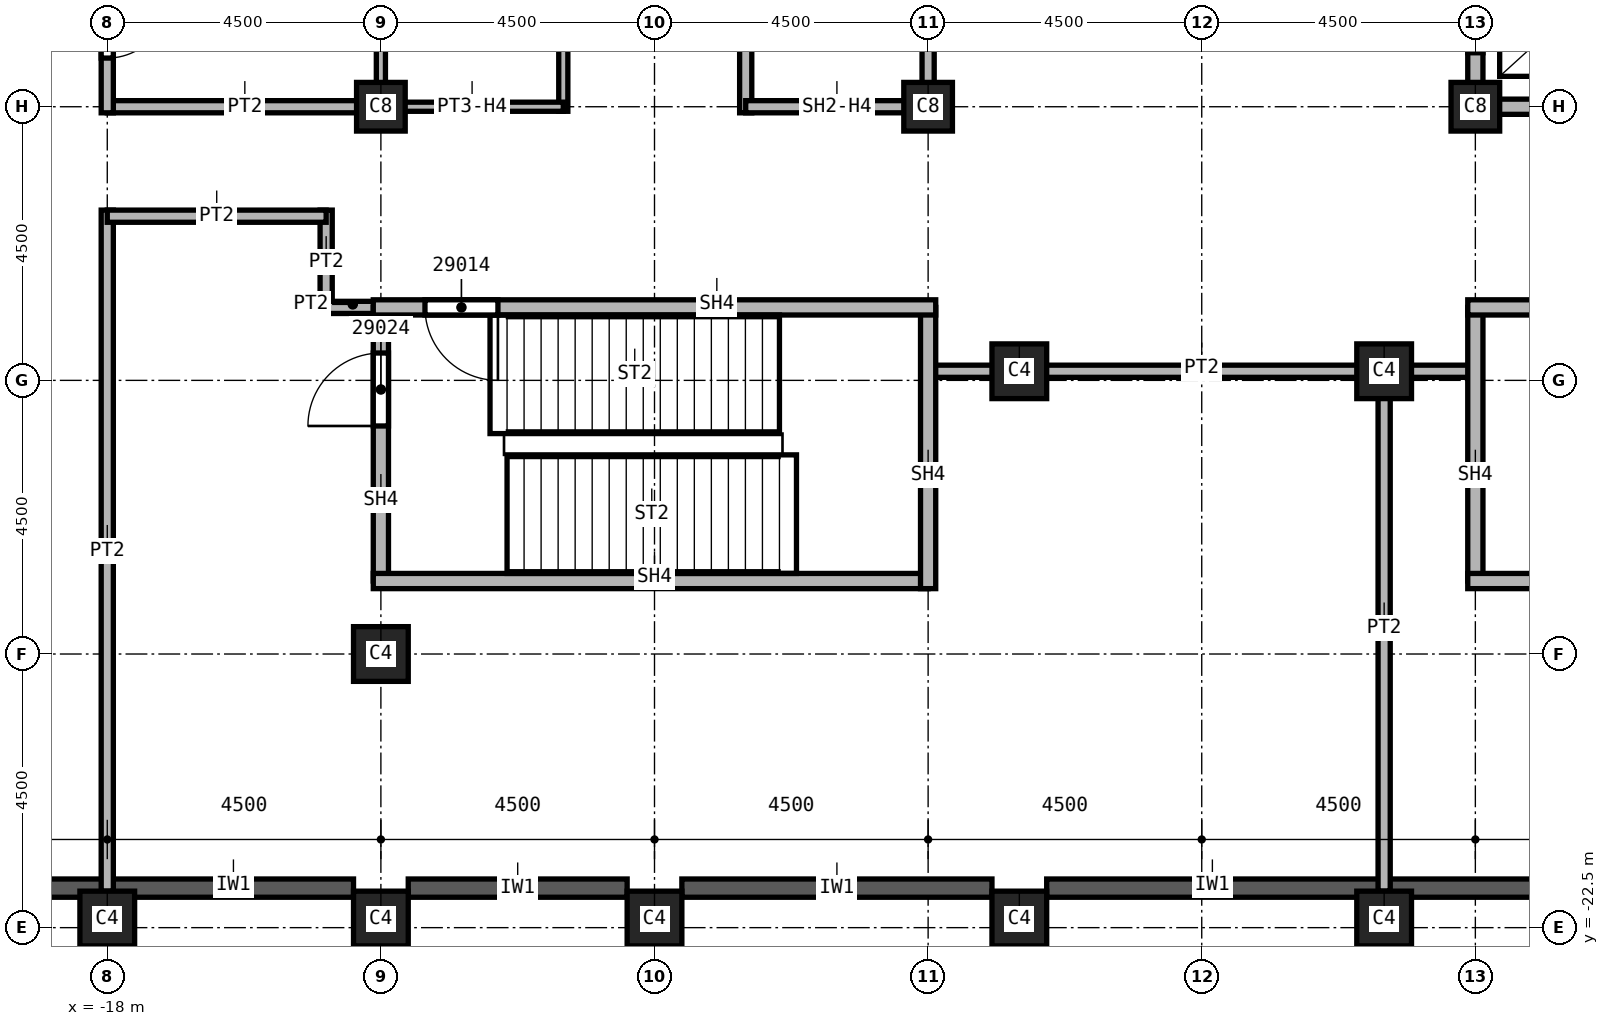
"""IFC4 building model, lengths in metres.
Left out: names, types, materials, properties, quantities, classifications, styles, units other than length and angle.
Written with IfcOpenShell. Run it as: python <this file> out.ifc"""

import sys

from ifc_helpers import new_model, si_unit, direction, frame, frame_2d, origin, origin_2d, place, context, subcontext, project, spatial, rectangle, extrude, element, fill, save


model = new_model("IFC4")
c1 = context("Model", 3, precision=1e-05, world=origin(), true_north=direction((0.0, 1.0)))
c2 = subcontext(c1, "Body", "Model", "MODEL_VIEW")
j1 = project(units=[si_unit("LENGTHUNIT", "METRE"), si_unit("PLANEANGLEUNIT", "RADIAN")], contexts=[c1])
p1 = place(None, origin())
s1 = spatial("IfcSite", under=j1, at=p1, CompositionType="ELEMENT")
p2 = place(p1, origin())
s2 = spatial("IfcBuilding", under=s1, at=p2, CompositionType="ELEMENT")
p3 = place(p2, frame((0.0, 0.0, 294.0)))
s3 = spatial("IfcBuildingStorey", under=s2, at=p3, CompositionType="ELEMENT", Elevation=294.0)
p4 = place(p3, frame((-13.5, -18.0, 0.0), z_axis=(0.0, 0.0, 1.0), x_axis=(1.0, 0.0, 0.0)))
e1 = element("IfcColumn", 1, at=p4, inside=s3, PredefinedType="COLUMN", context=c2, shape_type="SweptSolid", body=[
    extrude(rectangle(XDim=0.9, YDim=0.9, at=origin_2d()), origin(), (0.0, 0.0, 1.0), 5.74),
])
for number, where, z_axis, x_axis in (
    (2, (4.5, -9.0, 0.0), (0.0, 0.0, 1.0), (1.0, 0.0, 0.0)),
    (3, (-4.5, -9.0, 0.0), (0.0, 0.0, 1.0), (1.0, 0.0, 0.0)),
    (4, (-13.5, -9.0, 0.0), (0.0, 0.0, 1.0), (1.0, 0.0, 0.0)),
):
    element("IfcColumn", number, at=place(p3, frame(where, z_axis=z_axis, x_axis=x_axis)), inside=s3, PredefinedType="COLUMN", context=c2, shape_type="SweptSolid", body=[
        extrude(rectangle(XDim=0.8, YDim=0.8, at=origin_2d()), origin(), (0.0, 0.0, 1.0), 5.74),
    ])
for number, where, z_axis, x_axis in (
    (5, (3.0, -22.35, 0.0), (0.0, -0.18, 0.984), (1.0, 0.0, 0.0)),
    (6, (-3.0, -22.35, 0.0), (0.0, -0.18, 0.984), (1.0, 0.0, 0.0)),
    (7, (-9.0, -22.35, 0.0), (0.0, -0.18, 0.984), (1.0, 0.0, 0.0)),
    (8, (-13.5, -22.35, 0.0), (0.0, -0.18, 0.984), (1.0, 0.0, 0.0)),
    (9, (-18.0, -22.35, 0.0), (0.0, -0.18, 0.984), (1.0, 0.0, 0.0)),
    (10, (3.0, -13.35, 0.0), (0.0, -0.18, 0.984), (1.0, 0.0, 0.0)),
    (11, (-3.0, -13.35, 0.0), (0.0, -0.18, 0.984), (1.0, 0.0, 0.0)),
):
    element("IfcColumn", number, at=place(p3, frame(where, z_axis=z_axis, x_axis=x_axis)), inside=s3, PredefinedType="COLUMN", context=c2, shape_type="SweptSolid", body=[
        extrude(rectangle(XDim=0.9, YDim=0.9, at=origin_2d()), origin(), (0.0, 0.0, 1.0), 5.835),
    ])
for number, where, z_axis, x_axis in (
    (12, (-22.05, -21.85, 0.0), (0.0, 0.0, 1.0), (1.0, 0.0, 0.0)),
    (13, (-17.95, -21.85, 0.0), (0.0, 0.0, 1.0), (1.0, 0.0, 0.0)),
):
    element("IfcWall", number, at=place(p3, frame(where, z_axis=z_axis, x_axis=x_axis)), inside=s3, PredefinedType="SOLIDWALL", context=c2, shape_type="SweptSolid", body=[
        extrude(rectangle(XDim=4.0, YDim=0.3, at=frame_2d((2.0, 0.0))), origin(), (0.0, 0.0, 1.0), 5.14),
    ])
p5 = place(p3, frame((-13.05, -21.85, 0.0), z_axis=(0.0, 0.0, 1.0), x_axis=(1.0, 0.0, 0.0)))
e14 = element("IfcWall", 14, at=p5, inside=s3, PredefinedType="SOLIDWALL", context=c2, shape_type="SweptSolid", body=[
    extrude(rectangle(XDim=3.6, YDim=0.3, at=frame_2d((1.8, 0.0))), origin(), (0.0, 0.0, 1.0), 5.14),
])
p6 = place(p3, frame((-8.55, -21.85, 0.0), z_axis=(0.0, 0.0, 1.0), x_axis=(1.0, 0.0, 0.0)))
e15 = element("IfcWall", 15, at=p6, inside=s3, PredefinedType="SOLIDWALL", context=c2, shape_type="SweptSolid", body=[
    extrude(rectangle(XDim=5.1, YDim=0.3, at=frame_2d((2.55, 0.0))), origin(), (0.0, 0.0, 1.0), 5.14),
])
for number, where, z_axis, x_axis in (
    (16, (-2.55, -21.85, 0.0), (0.0, 0.0, 1.0), (1.0, 0.0, 0.0)),
    (17, (3.05, -21.85, 0.0), (0.0, 0.0, 1.0), (1.0, 0.0, 0.0)),
):
    element("IfcWall", number, at=place(p3, frame(where, z_axis=z_axis, x_axis=x_axis)), inside=s3, PredefinedType="SOLIDWALL", context=c2, shape_type="SweptSolid", body=[
        extrude(rectangle(XDim=5.5, YDim=0.3, at=frame_2d((2.75, 0.0))), origin(), (0.0, 0.0, 1.0), 5.14),
    ])
p7 = place(p3, frame((-18.0, -10.7, 0.0), z_axis=(0.0, 0.0, 1.0), x_axis=(0.0, -1.0, 0.0)))
e18 = element("IfcWall", 18, at=p7, inside=s3, PredefinedType="PARTITIONING", context=c2, shape_type="SweptSolid", body=[
    extrude(rectangle(XDim=11.2, YDim=0.2, at=frame_2d((5.6, 0.0))), origin(), (0.0, 0.0, 1.0), 5.74),
])
p8 = place(p3, frame((-18.0, -9.0, 0.0), z_axis=(0.0, 0.0, 1.0), x_axis=(1.0, 0.0, 0.0)))
e19 = element("IfcWall", 19, at=p8, inside=s3, PredefinedType="PARTITIONING", context=c2, shape_type="SweptSolid", body=[
    extrude(rectangle(XDim=4.5, YDim=0.2, at=frame_2d((2.25, 0.0))), origin(), (0.0, 0.0, 1.0), 5.74),
])
p9 = place(p3, frame((-18.0, 9.1, 0.0), z_axis=(0.0, 0.0, 1.0), x_axis=(0.0, -1.0, 0.0)))
e20 = element("IfcWall", 20, at=p9, inside=s3, PredefinedType="PARTITIONING", context=c2, shape_type="SweptSolid", body=[
    extrude(rectangle(XDim=18.2, YDim=0.2, at=frame_2d((9.1, 0.0))), origin(), (0.0, 0.0, 1.0), 5.74),
])
p10 = place(p9, frame((16.3, 0.0, 0.0)))
e21 = element("IfcOpeningElement", 21, at=p10, cuts=e20, PredefinedType="OPENING", context=c2, shape_type="SweptSolid", body=[
    extrude(rectangle(XDim=1.0, YDim=2.1, at=frame_2d((0.5, 1.05))), frame((0.0, 0.1, 0.0), z_axis=(0.0, -1.0, 0.0), x_axis=(1.0, 0.0, 0.0)), (0.0, 0.0, 1.0), 0.2),
])
p11 = place(p9, frame((6.4, 0.0, 0.0)))
e22 = element("IfcOpeningElement", 22, at=p11, cuts=e20, PredefinedType="OPENING", context=c2, shape_type="SweptSolid", body=[
    extrude(rectangle(XDim=1.0, YDim=2.1, at=frame_2d((0.5, 1.05))), frame((0.0, 0.1, 0.0), z_axis=(0.0, -1.0, 0.0), x_axis=(1.0, 0.0, 0.0)), (0.0, 0.0, 1.0), 0.2),
])
p12 = place(p3, frame((-14.4, -12.3, 0.0), z_axis=(0.0, 0.0, 1.0), x_axis=(0.0, 1.0, 0.0)))
e23 = element("IfcWall", 23, at=p12, inside=s3, PredefinedType="PARTITIONING", context=c2, shape_type="SweptSolid", body=[
    extrude(rectangle(XDim=1.6, YDim=0.2, at=frame_2d((0.8, 0.0))), origin(), (0.0, 0.0, 1.0), 5.74),
])
p13 = place(p3, frame((-14.4, -10.8, 0.0), z_axis=(0.0, 0.0, 1.0), x_axis=(-1.0, 0.0, 0.0)))
e24 = element("IfcWall", 24, at=p13, inside=s3, PredefinedType="PARTITIONING", context=c2, shape_type="SweptSolid", body=[
    extrude(rectangle(XDim=3.6, YDim=0.2, at=frame_2d((1.8, 0.0))), origin(), (0.0, 0.0, 1.0), 5.74),
])
p14 = place(p3, frame((-13.375, -12.3, 0.0), z_axis=(0.0, 0.0, 1.0), x_axis=(-1.0, 0.0, 0.0)))
e25 = element("IfcWall", 25, at=p14, inside=s3, PredefinedType="PARTITIONING", context=c2, shape_type="SweptSolid", body=[
    extrude(rectangle(XDim=1.125, YDim=0.2, at=frame_2d((0.562, 0.0))), origin(), (0.0, 0.0, 1.0), 5.74),
])
p15 = place(p3, frame((4.5, -13.35, 0.0), z_axis=(0.0, 0.0, 1.0), x_axis=(-1.0, 0.0, 0.0)))
e26 = element("IfcWall", 26, at=p15, inside=s3, PredefinedType="PARTITIONING", context=c2, shape_type="SweptSolid", body=[
    extrude(rectangle(XDim=9.0, YDim=0.2, at=frame_2d((4.5, 0.0))), origin(), (0.0, 0.0, 1.0), 5.74),
])
p16 = place(p3, frame((3.0, -13.35, 0.0), z_axis=(0.0, 0.0, 1.0), x_axis=(0.0, -1.0, 0.0)))
e27 = element("IfcWall", 27, at=p16, inside=s3, PredefinedType="PARTITIONING", context=c2, shape_type="SweptSolid", body=[
    extrude(rectangle(XDim=8.55, YDim=0.2, at=frame_2d((4.275, 0.0))), origin(), (0.0, 0.0, 1.0), 5.74),
])
p17 = place(p3, frame((-7.5, -9.1, 0.0), z_axis=(0.0, 0.0, 1.0), x_axis=(0.0, 1.0, 0.0)))
e28 = element("IfcWall", 28, at=p17, inside=s3, PredefinedType="SOLIDWALL", context=c2, shape_type="SweptSolid", body=[
    extrude(rectangle(XDim=6.225, YDim=0.2, at=frame_2d((3.113, 0.0))), origin(), (0.0, 0.0, 1.0), 5.74),
])
p18 = place(p3, frame((-4.5, -9.0, 0.0), z_axis=(0.0, 0.0, 1.0), x_axis=(-1.0, 0.0, 0.0)))
e29 = element("IfcWall", 29, at=p18, inside=s3, PredefinedType="SOLIDWALL", context=c2, shape_type="SweptSolid", body=[
    extrude(rectangle(XDim=3.0, YDim=0.2, at=frame_2d((1.5, 0.0))), origin(), (0.0, 0.0, 1.0), 5.062),
])
p19 = place(p3, frame((-4.5, 0.0, 0.0), z_axis=(0.0, 0.0, 1.0), x_axis=(0.0, -1.0, 0.0)))
e30 = element("IfcWall", 30, at=p19, inside=s3, PredefinedType="SOLIDWALL", context=c2, shape_type="SweptSolid", body=[
    extrude(rectangle(XDim=9.1, YDim=0.2, at=frame_2d((4.55, 0.0))), origin(), (0.0, 0.0, 1.0), 5.062),
])
p20 = place(p19, frame((1.3, 0.0, 0.0)))
e31 = element("IfcOpeningElement", 31, at=p20, cuts=e30, PredefinedType="OPENING", context=c2, shape_type="SweptSolid", body=[
    extrude(rectangle(XDim=1.1, YDim=2.1, at=frame_2d((0.55, 1.05))), frame((0.0, 0.1, 0.0), z_axis=(0.0, -1.0, 0.0), x_axis=(1.0, 0.0, 0.0)), (0.0, 0.0, 1.0), 0.2),
])
p21 = place(p3, frame((4.5, -9.125, 0.0), z_axis=(0.0, 0.0, 1.0), x_axis=(0.0, 1.0, 0.0)))
e32 = element("IfcWall", 32, at=p21, inside=s3, PredefinedType="SOLIDWALL", context=c2, shape_type="SweptSolid", body=[
    extrude(rectangle(XDim=9.125, YDim=0.25, at=frame_2d((4.562, 0.0))), origin(), (0.0, 0.0, 1.0), 5.062),
])
p22 = place(p21, frame((1.012, 0.0, 0.0)))
e33 = element("IfcOpeningElement", 33, at=p22, cuts=e32, PredefinedType="OPENING", context=c2, shape_type="SweptSolid", body=[
    extrude(rectangle(XDim=1.1, YDim=2.1, at=frame_2d((0.55, 1.05))), frame((0.0, 0.125, 0.0), z_axis=(0.0, -1.0, 0.0), x_axis=(1.0, 0.0, 0.0)), (0.0, 0.0, 1.0), 0.25),
])
p23 = place(p21, frame((4.075, 0.0, 0.0)))
e34 = element("IfcOpeningElement", 34, at=p23, cuts=e32, PredefinedType="OPENING", context=c2, shape_type="SweptSolid", body=[
    extrude(rectangle(XDim=1.1, YDim=2.1, at=frame_2d((0.55, 1.05))), frame((0.0, 0.125, 0.0), z_axis=(0.0, -1.0, 0.0), x_axis=(1.0, 0.0, 0.0)), (0.0, 0.0, 1.0), 0.25),
])
p24 = place(p21, frame((7.075, 0.0, 0.0)))
e35 = element("IfcOpeningElement", 35, at=p24, cuts=e32, PredefinedType="OPENING", context=c2, shape_type="SweptSolid", body=[
    extrude(rectangle(XDim=1.1, YDim=2.1, at=frame_2d((0.55, 1.05))), frame((0.0, 0.125, 0.0), z_axis=(0.0, -1.0, 0.0), x_axis=(1.0, 0.0, 0.0)), (0.0, 0.0, 1.0), 0.25),
])
p25 = place(p3, frame((7.5, -9.0, 0.0), z_axis=(0.0, 0.0, 1.0), x_axis=(-1.0, 0.0, 0.0)))
e36 = element("IfcWall", 36, at=p25, inside=s3, PredefinedType="SOLIDWALL", context=c2, shape_type="SweptSolid", body=[
    extrude(rectangle(XDim=3.0, YDim=0.25, at=frame_2d((1.5, 0.0))), origin(), (0.0, 0.0, 1.0), 5.062),
])
p26 = place(p3, frame((-13.5, -16.8, 0.0), z_axis=(0.0, 0.0, 1.0), x_axis=(0.0, 1.0, 0.0)))
e37 = element("IfcWall", 37, at=p26, inside=s3, PredefinedType="SOLIDWALL", context=c2, shape_type="SweptSolid", body=[
    extrude(rectangle(XDim=4.5, YDim=0.25, at=frame_2d((2.25, 0.0))), origin(), (0.0, 0.0, 1.0), 5.74),
])
p27 = place(p26, frame((2.55, 0.0, 0.0)))
e38 = element("IfcOpeningElement", 38, at=p27, cuts=e37, PredefinedType="OPENING", context=c2, shape_type="SweptSolid", body=[
    extrude(rectangle(XDim=1.2, YDim=2.1, at=frame_2d((0.6, 1.05))), frame((0.0, 0.125, 0.0), z_axis=(0.0, -1.0, 0.0), x_axis=(1.0, 0.0, 0.0)), (0.0, 0.0, 1.0), 0.25),
])
p28 = place(p3, frame((-4.5, -16.8, 0.0), z_axis=(0.0, 0.0, 1.0), x_axis=(-1.0, 0.0, 0.0)))
e39 = element("IfcWall", 39, at=p28, inside=s3, PredefinedType="SOLIDWALL", context=c2, shape_type="SweptSolid", body=[
    extrude(rectangle(XDim=9.125, YDim=0.25, at=frame_2d((4.562, 0.0))), origin(), (0.0, 0.0, 1.0), 5.74),
])
p29 = place(p3, frame((-4.5, -12.3, 0.0), z_axis=(0.0, 0.0, 1.0), x_axis=(0.0, -1.0, 0.0)))
e40 = element("IfcWall", 40, at=p29, inside=s3, PredefinedType="SOLIDWALL", context=c2, shape_type="SweptSolid", body=[
    extrude(rectangle(XDim=4.625, YDim=0.25, at=frame_2d((2.312, 0.0))), origin(), (0.0, 0.0, 1.0), 5.74),
])
p30 = place(p3, frame((-4.375, -12.3, 0.0), z_axis=(0.0, 0.0, 1.0), x_axis=(-1.0, 0.0, 0.0)))
e41 = element("IfcWall", 41, at=p30, inside=s3, PredefinedType="SOLIDWALL", context=c2, shape_type="SweptSolid", body=[
    extrude(rectangle(XDim=9.25, YDim=0.25, at=frame_2d((4.625, 0.0))), origin(), (0.0, 0.0, 1.0), 5.74),
])
p31 = place(p30, frame((7.2, 0.0, 0.0)))
e42 = element("IfcOpeningElement", 42, at=p31, cuts=e41, PredefinedType="OPENING", context=c2, shape_type="SweptSolid", body=[
    extrude(rectangle(XDim=1.2, YDim=2.1, at=frame_2d((0.6, 1.05))), frame((0.0, 0.125, 0.0), z_axis=(0.0, -1.0, 0.0), x_axis=(1.0, 0.0, 0.0)), (0.0, 0.0, 1.0), 0.25),
])
p32 = place(p3, frame((4.5, -16.8, 0.0), z_axis=(0.0, 0.0, 1.0), x_axis=(0.0, 1.0, 0.0)))
e43 = element("IfcWall", 43, at=p32, inside=s3, PredefinedType="SOLIDWALL", context=c2, shape_type="SweptSolid", body=[
    extrude(rectangle(XDim=4.5, YDim=0.25, at=frame_2d((2.25, 0.0))), origin(), (0.0, 0.0, 1.0), 5.74),
])
p33 = place(p3, frame((13.5, -16.8, 0.0), z_axis=(0.0, 0.0, 1.0), x_axis=(-1.0, 0.0, 0.0)))
e44 = element("IfcWall", 44, at=p33, inside=s3, PredefinedType="SOLIDWALL", context=c2, shape_type="SweptSolid", body=[
    extrude(rectangle(XDim=9.125, YDim=0.25, at=frame_2d((4.562, 0.0))), origin(), (0.0, 0.0, 1.0), 5.74),
])
p34 = place(p3, frame((13.625, -12.3, 0.0), z_axis=(0.0, 0.0, 1.0), x_axis=(-1.0, 0.0, 0.0)))
e45 = element("IfcWall", 45, at=p34, inside=s3, PredefinedType="SOLIDWALL", context=c2, shape_type="SweptSolid", body=[
    extrude(rectangle(XDim=9.25, YDim=0.25, at=frame_2d((4.625, 0.0))), origin(), (0.0, 0.0, 1.0), 5.74),
])
p35 = place(p34, frame((0.85, 0.0, 0.0)))
e46 = element("IfcOpeningElement", 46, at=p35, cuts=e45, PredefinedType="OPENING", context=c2, shape_type="SweptSolid", body=[
    extrude(rectangle(XDim=1.2, YDim=2.1, at=frame_2d((0.6, 1.05))), frame((0.0, 0.125, 0.0), z_axis=(0.0, -1.0, 0.0), x_axis=(1.0, 0.0, 0.0)), (0.0, 0.0, 1.0), 0.25),
])
p36 = place(p3, frame((-13.5, -9.1, 0.0), z_axis=(0.0, 0.0, 1.0), x_axis=(0.0, 1.0, 0.0)))
e47 = element("IfcWall", 47, at=p36, inside=s3, PredefinedType="PARTITIONING", context=c2, shape_type="SweptSolid", body=[
    extrude(rectangle(XDim=4.1, YDim=0.15, at=frame_2d((2.05, 0.0))), origin(), (0.0, 0.0, 1.0), 5.062),
])
p37 = place(p3, frame((-10.5, -9.075, 0.0), z_axis=(0.0, 0.0, 1.0), x_axis=(0.0, 1.0, 0.0)))
e48 = element("IfcWall", 48, at=p37, inside=s3, PredefinedType="PARTITIONING", context=c2, shape_type="SweptSolid", body=[
    extrude(rectangle(XDim=4.15, YDim=0.15, at=frame_2d((2.075, 0.0))), origin(), (0.0, 0.0, 1.0), 5.74),
])
p38 = place(p37, frame((2.95, 0.0, 0.0)))
e49 = element("IfcOpeningElement", 49, at=p38, cuts=e48, PredefinedType="OPENING", context=c2, shape_type="SweptSolid", body=[
    extrude(rectangle(XDim=0.9, YDim=2.1, at=frame_2d((0.45, 1.05))), frame((0.0, 0.075, 0.0), z_axis=(0.0, -1.0, 0.0), x_axis=(1.0, 0.0, 0.0)), (0.0, 0.0, 1.0), 0.15),
])
p39 = place(p3, frame((-10.5, -9.0, 0.0), z_axis=(0.0, 0.0, 1.0), x_axis=(-1.0, 0.0, 0.0)))
e50 = element("IfcWall", 50, at=p39, inside=s3, PredefinedType="PARTITIONING", context=c2, shape_type="SweptSolid", body=[
    extrude(rectangle(XDim=3.075, YDim=0.15, at=frame_2d((1.538, 0.0))), origin(), (0.0, 0.0, 1.0), 5.062),
])
p40 = place(p31, origin())
e51 = element("IfcDoor", 51, at=p40, inside=s3, OperationType="SINGLE_SWING_LEFT", PredefinedType="DOOR", context=c2, shape_type="SweptSolid", body=[
    extrude(rectangle(XDim=1.2, YDim=2.1, at=frame_2d((0.6, 1.05))), frame((0.0, 0.025, 0.0), z_axis=(0.0, -1.0, 0.0), x_axis=(1.0, 0.0, 0.0)), (0.0, 0.0, 1.0), 0.05),
])
fill(e42, e51)
p41 = place(p10, origin())
e52 = element("IfcDoor", 52, at=p41, inside=s3, OperationType="SINGLE_SWING_RIGHT", PredefinedType="DOOR", context=c2, shape_type="SweptSolid", body=[
    extrude(rectangle(XDim=1.0, YDim=2.1, at=frame_2d((0.5, 1.05))), frame((0.0, 0.025, 0.0), z_axis=(0.0, -1.0, 0.0), x_axis=(1.0, 0.0, 0.0)), (0.0, 0.0, 1.0), 0.05),
])
fill(e21, e52)
p42 = place(p27, origin())
e53 = element("IfcDoor", 53, at=p42, inside=s3, OperationType="SINGLE_SWING_LEFT", PredefinedType="DOOR", context=c2, shape_type="SweptSolid", body=[
    extrude(rectangle(XDim=1.2, YDim=2.1, at=frame_2d((0.6, 1.05))), frame((0.0, 0.025, 0.0), z_axis=(0.0, -1.0, 0.0), x_axis=(1.0, 0.0, 0.0)), (0.0, 0.0, 1.0), 0.05),
])
fill(e38, e53)
p43 = place(p22, origin())
e54 = element("IfcDoor", 54, at=p43, inside=s3, OperationType="SLIDING_TO_LEFT", PredefinedType="DOOR", context=c2, shape_type="SweptSolid", body=[
    extrude(rectangle(XDim=1.1, YDim=2.1, at=frame_2d((0.55, 1.05))), frame((0.0, 0.025, 0.0), z_axis=(0.0, -1.0, 0.0), x_axis=(1.0, 0.0, 0.0)), (0.0, 0.0, 1.0), 0.05),
])
fill(e33, e54)
save(model, sys.argv[1])
